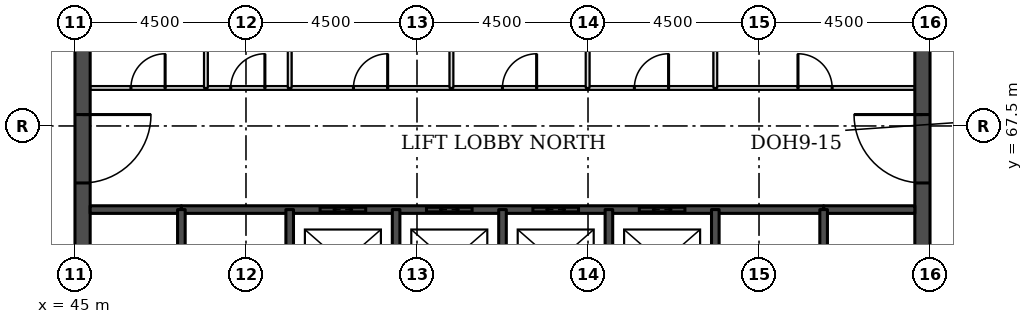
"""IFC4 building model, lengths in metres.
Left out: names, types, materials, properties, quantities, classifications, styles, units other than length and angle.
Written with IfcOpenShell. Run it as: python <this file> out.ifc"""

import sys

from ifc_helpers import new_model, si_unit, direction, frame, frame_2d, origin, place, context, subcontext, project, spatial, rectangle, extrude, element, fill, save


model = new_model("IFC4")
c1 = context("Model", 3, precision=1e-05, world=origin(), true_north=direction((0.0, 1.0)))
c2 = subcontext(c1, "Body", "Model", "MODEL_VIEW")
j1 = project(units=[si_unit("LENGTHUNIT", "METRE"), si_unit("PLANEANGLEUNIT", "RADIAN")], contexts=[c1])
p1 = place(None, origin())
s1 = spatial("IfcSite", under=j1, at=p1, CompositionType="ELEMENT")
p2 = place(p1, origin())
s2 = spatial("IfcBuilding", under=s1, at=p2, CompositionType="ELEMENT")
p3 = place(p2, frame((0.0, 0.0, 211.9)))
s3 = spatial("IfcBuildingStorey", under=s2, at=p3, CompositionType="ELEMENT", Elevation=211.9)
p4 = place(p3, frame((45.2, 49.5, 0.0), z_axis=(0.0, 0.0, 1.0), x_axis=(0.0, 1.0, 0.0)))
e1 = element("IfcWall", 1, at=p4, inside=s3, PredefinedType="SHEAR", context=c2, shape_type="SweptSolid", body=[
    extrude(rectangle(XDim=22.5, YDim=0.4, at=frame_2d((11.25, 0.0))), origin(), (0.0, 0.0, 1.0), 3.7),
])
p5 = place(p4, frame((4.2, 0.0, 0.0)))
e2 = element("IfcOpeningElement", 2, at=p5, cuts=e1, PredefinedType="OPENING", context=c2, shape_type="SweptSolid", body=[
    extrude(rectangle(XDim=1.8, YDim=2.1, at=frame_2d((0.9, 1.05))), frame((0.0, 0.21, 0.0), z_axis=(0.0, -1.0, 0.0), x_axis=(1.0, 0.0, 0.0)), (0.0, 0.0, 1.0), 0.42),
])
p6 = place(p4, frame((6.9, 0.0, 0.0)))
e3 = element("IfcOpeningElement", 3, at=p6, cuts=e1, PredefinedType="OPENING", context=c2, shape_type="SweptSolid", body=[
    extrude(rectangle(XDim=1.1, YDim=2.1, at=frame_2d((0.55, 1.05))), frame((0.0, 0.21, 0.0), z_axis=(0.0, -1.0, 0.0), x_axis=(1.0, 0.0, 0.0)), (0.0, 0.0, 1.0), 0.42),
])
p7 = place(p4, frame((13.6, 0.0, 0.0)))
e4 = element("IfcOpeningElement", 4, at=p7, cuts=e1, PredefinedType="OPENING", context=c2, shape_type="SweptSolid", body=[
    extrude(rectangle(XDim=1.1, YDim=2.1, at=frame_2d((0.55, 1.05))), frame((0.0, 0.21, 0.0), z_axis=(0.0, -1.0, 0.0), x_axis=(1.0, 0.0, 0.0)), (0.0, 0.0, 1.0), 0.42),
])
p8 = place(p4, frame((16.5, 0.0, 0.0)))
e5 = element("IfcOpeningElement", 5, at=p8, cuts=e1, PredefinedType="OPENING", context=c2, shape_type="SweptSolid", body=[
    extrude(rectangle(XDim=1.8, YDim=2.1, at=frame_2d((0.9, 1.05))), frame((0.0, 0.21, 0.0), z_axis=(0.0, -1.0, 0.0), x_axis=(1.0, 0.0, 0.0)), (0.0, 0.0, 1.0), 0.42),
])
p9 = place(p3, frame((67.3, 49.5, 0.0), z_axis=(0.0, 0.0, 1.0), x_axis=(0.0, 1.0, 0.0)))
e6 = element("IfcWall", 6, at=p9, inside=s3, PredefinedType="SHEAR", context=c2, shape_type="SweptSolid", body=[
    extrude(rectangle(XDim=22.5, YDim=0.4, at=frame_2d((11.25, 0.0))), origin(), (0.0, 0.0, 1.0), 3.7),
])
p10 = place(p9, frame((4.2, 0.0, 0.0)))
e7 = element("IfcOpeningElement", 7, at=p10, cuts=e6, PredefinedType="OPENING", context=c2, shape_type="SweptSolid", body=[
    extrude(rectangle(XDim=1.8, YDim=2.1, at=frame_2d((0.9, 1.05))), frame((0.0, 0.21, 0.0), z_axis=(0.0, -1.0, 0.0), x_axis=(1.0, 0.0, 0.0)), (0.0, 0.0, 1.0), 0.42),
])
p11 = place(p9, frame((6.9, 0.0, 0.0)))
e8 = element("IfcOpeningElement", 8, at=p11, cuts=e6, PredefinedType="OPENING", context=c2, shape_type="SweptSolid", body=[
    extrude(rectangle(XDim=1.1, YDim=2.1, at=frame_2d((0.55, 1.05))), frame((0.0, 0.21, 0.0), z_axis=(0.0, -1.0, 0.0), x_axis=(1.0, 0.0, 0.0)), (0.0, 0.0, 1.0), 0.42),
])
p12 = place(p9, frame((13.6, 0.0, 0.0)))
e9 = element("IfcOpeningElement", 9, at=p12, cuts=e6, PredefinedType="OPENING", context=c2, shape_type="SweptSolid", body=[
    extrude(rectangle(XDim=1.1, YDim=2.1, at=frame_2d((0.55, 1.05))), frame((0.0, 0.21, 0.0), z_axis=(0.0, -1.0, 0.0), x_axis=(1.0, 0.0, 0.0)), (0.0, 0.0, 1.0), 0.42),
])
p13 = place(p9, frame((16.5, 0.0, 0.0)))
e10 = element("IfcOpeningElement", 10, at=p13, cuts=e6, PredefinedType="OPENING", context=c2, shape_type="SweptSolid", body=[
    extrude(rectangle(XDim=1.8, YDim=2.1, at=frame_2d((0.9, 1.05))), frame((0.0, 0.21, 0.0), z_axis=(0.0, -1.0, 0.0), x_axis=(1.0, 0.0, 0.0)), (0.0, 0.0, 1.0), 0.42),
])
for number, where, z_axis, x_axis in (
    (11, (45.4, 65.3, 0.0), (0.0, 0.0, 1.0), (1.0, 0.0, 0.0)),
    (12, (64.7, 65.3, 0.0), (0.0, 0.0, 1.0), (1.0, 0.0, 0.0)),
):
    element("IfcWall", number, at=place(p3, frame(where, z_axis=z_axis, x_axis=x_axis)), inside=s3, PredefinedType="SOLIDWALL", context=c2, shape_type="SweptSolid", body=[
        extrude(rectangle(XDim=2.4, YDim=0.2, at=frame_2d((1.2, 0.0))), origin(), (0.0, 0.0, 1.0), 3.55),
    ])
p14 = place(p3, frame((47.8, 65.3, 0.0), z_axis=(0.0, 0.0, 1.0), x_axis=(1.0, 0.0, 0.0)))
e13 = element("IfcWall", 13, at=p14, inside=s3, PredefinedType="SOLIDWALL", context=c2, shape_type="SweptSolid", body=[
    extrude(rectangle(XDim=16.9, YDim=0.2, at=frame_2d((8.45, 0.0))), origin(), (0.0, 0.0, 1.0), 3.55),
])
p15 = place(p14, frame((3.65, 0.0, 0.0)))
e14 = element("IfcOpeningElement", 14, at=p15, cuts=e13, PredefinedType="OPENING", context=c2, shape_type="SweptSolid", body=[
    extrude(rectangle(XDim=1.2, YDim=2.1, at=frame_2d((0.6, 1.05))), frame((0.0, 0.11, 0.0), z_axis=(0.0, -1.0, 0.0), x_axis=(1.0, 0.0, 0.0)), (0.0, 0.0, 1.0), 0.22),
])
p16 = place(p14, frame((6.45, 0.0, 0.0)))
e15 = element("IfcOpeningElement", 15, at=p16, cuts=e13, PredefinedType="OPENING", context=c2, shape_type="SweptSolid", body=[
    extrude(rectangle(XDim=1.2, YDim=2.1, at=frame_2d((0.6, 1.05))), frame((0.0, 0.11, 0.0), z_axis=(0.0, -1.0, 0.0), x_axis=(1.0, 0.0, 0.0)), (0.0, 0.0, 1.0), 0.22),
])
p17 = place(p14, frame((9.25, 0.0, 0.0)))
e16 = element("IfcOpeningElement", 16, at=p17, cuts=e13, PredefinedType="OPENING", context=c2, shape_type="SweptSolid", body=[
    extrude(rectangle(XDim=1.2, YDim=2.1, at=frame_2d((0.6, 1.05))), frame((0.0, 0.11, 0.0), z_axis=(0.0, -1.0, 0.0), x_axis=(1.0, 0.0, 0.0)), (0.0, 0.0, 1.0), 0.22),
])
p18 = place(p14, frame((12.05, 0.0, 0.0)))
e17 = element("IfcOpeningElement", 17, at=p18, cuts=e13, PredefinedType="OPENING", context=c2, shape_type="SweptSolid", body=[
    extrude(rectangle(XDim=1.2, YDim=2.1, at=frame_2d((0.6, 1.05))), frame((0.0, 0.11, 0.0), z_axis=(0.0, -1.0, 0.0), x_axis=(1.0, 0.0, 0.0)), (0.0, 0.0, 1.0), 0.22),
])
p19 = place(p3, frame((45.4, 68.5, 0.0), z_axis=(0.0, 0.0, 1.0), x_axis=(1.0, 0.0, 0.0)))
e18 = element("IfcWall", 18, at=p19, inside=s3, PredefinedType="PARTITIONING", context=c2, shape_type="SweptSolid", body=[
    extrude(rectangle(XDim=21.7, YDim=0.1, at=frame_2d((10.85, 0.0))), origin(), (0.0, 0.0, 1.0), 3.55),
])
p20 = place(p19, frame((18.625, 0.0, 0.0)))
e19 = element("IfcOpeningElement", 19, at=p20, cuts=e18, PredefinedType="OPENING", context=c2, shape_type="SweptSolid", body=[
    extrude(rectangle(XDim=0.9, YDim=2.1, at=frame_2d((0.45, 1.05))), frame((0.0, 0.06, 0.0), z_axis=(0.0, -1.0, 0.0), x_axis=(1.0, 0.0, 0.0)), (0.0, 0.0, 1.0), 0.12),
])
p21 = place(p19, frame((1.073, 0.0, 0.0)))
e20 = element("IfcOpeningElement", 20, at=p21, cuts=e18, PredefinedType="OPENING", context=c2, shape_type="SweptSolid", body=[
    extrude(rectangle(XDim=0.9, YDim=2.1, at=frame_2d((0.45, 1.05))), frame((0.0, 0.06, 0.0), z_axis=(0.0, -1.0, 0.0), x_axis=(1.0, 0.0, 0.0)), (0.0, 0.0, 1.0), 0.12),
])
p22 = place(p19, frame((3.698, 0.0, 0.0)))
e21 = element("IfcOpeningElement", 21, at=p22, cuts=e18, PredefinedType="OPENING", context=c2, shape_type="SweptSolid", body=[
    extrude(rectangle(XDim=0.9, YDim=2.1, at=frame_2d((0.45, 1.05))), frame((0.0, 0.06, 0.0), z_axis=(0.0, -1.0, 0.0), x_axis=(1.0, 0.0, 0.0)), (0.0, 0.0, 1.0), 0.12),
])
p23 = place(p19, frame((14.32, 0.0, 0.0)))
e22 = element("IfcOpeningElement", 22, at=p23, cuts=e18, PredefinedType="OPENING", context=c2, shape_type="SweptSolid", body=[
    extrude(rectangle(XDim=0.9, YDim=2.1, at=frame_2d((0.45, 1.05))), frame((0.0, 0.06, 0.0), z_axis=(0.0, -1.0, 0.0), x_axis=(1.0, 0.0, 0.0)), (0.0, 0.0, 1.0), 0.12),
])
p24 = place(p19, frame((10.848, 0.0, 0.0)))
e23 = element("IfcOpeningElement", 23, at=p24, cuts=e18, PredefinedType="OPENING", context=c2, shape_type="SweptSolid", body=[
    extrude(rectangle(XDim=0.9, YDim=2.1, at=frame_2d((0.45, 1.05))), frame((0.0, 0.06, 0.0), z_axis=(0.0, -1.0, 0.0), x_axis=(1.0, 0.0, 0.0)), (0.0, 0.0, 1.0), 0.12),
])
p25 = place(p19, frame((6.928, 0.0, 0.0)))
e24 = element("IfcOpeningElement", 24, at=p25, cuts=e18, PredefinedType="OPENING", context=c2, shape_type="SweptSolid", body=[
    extrude(rectangle(XDim=0.9, YDim=2.1, at=frame_2d((0.45, 1.05))), frame((0.0, 0.06, 0.0), z_axis=(0.0, -1.0, 0.0), x_axis=(1.0, 0.0, 0.0)), (0.0, 0.0, 1.0), 0.12),
])
p26 = place(p3, frame((47.8, 62.0, 0.0), z_axis=(0.0, 0.0, 1.0), x_axis=(0.0, 1.0, 0.0)))
e25 = element("IfcWall", 25, at=p26, inside=s3, PredefinedType="SOLIDWALL", context=c2, shape_type="SweptSolid", body=[
    extrude(rectangle(XDim=3.3, YDim=0.2, at=frame_2d((1.65, 0.0))), origin(), (0.0, 0.0, 1.0), 3.55),
])
p27 = place(p26, frame((1.1, 0.0, 0.0)))
e26 = element("IfcOpeningElement", 26, at=p27, cuts=e25, PredefinedType="OPENING", context=c2, shape_type="SweptSolid", body=[
    extrude(rectangle(XDim=1.1, YDim=2.1, at=frame_2d((0.55, 1.05))), frame((0.0, 0.11, 0.0), z_axis=(0.0, -1.0, 0.0), x_axis=(1.0, 0.0, 0.0)), (0.0, 0.0, 1.0), 0.22),
])
for number, where, z_axis, x_axis in (
    (27, (48.445, 68.5, 0.0), (0.0, 0.0, 1.0), (0.0, 1.0, 0.0)),
    (28, (50.65, 68.5, 0.0), (0.0, 0.0, 1.0), (0.0, 1.0, 0.0)),
):
    element("IfcWall", number, at=place(p3, frame(where, z_axis=z_axis, x_axis=x_axis)), inside=s3, PredefinedType="PARTITIONING", context=c2, shape_type="SweptSolid", body=[
        extrude(rectangle(XDim=3.1, YDim=0.1, at=frame_2d((1.55, 0.0))), origin(), (0.0, 0.0, 1.0), 3.55),
    ])
p28 = place(p3, frame((50.65, 62.0, 0.0), z_axis=(0.0, 0.0, 1.0), x_axis=(0.0, 1.0, 0.0)))
e29 = element("IfcWall", 29, at=p28, inside=s3, PredefinedType="SOLIDWALL", context=c2, shape_type="SweptSolid", body=[
    extrude(rectangle(XDim=3.3, YDim=0.2, at=frame_2d((1.65, 0.0))), origin(), (0.0, 0.0, 1.0), 3.55),
])
p29 = place(p3, frame((53.45, 62.5, 0.0), z_axis=(0.0, 0.0, 1.0), x_axis=(0.0, 1.0, 0.0)))
e30 = element("IfcWall", 30, at=p29, inside=s3, PredefinedType="SOLIDWALL", context=c2, shape_type="SweptSolid", body=[
    extrude(rectangle(XDim=2.8, YDim=0.2, at=frame_2d((1.4, 0.0))), origin(), (0.0, 0.0, 1.0), 3.55),
])
p30 = place(p3, frame((54.906, 68.5, 0.0), z_axis=(0.0, 0.0, 1.0), x_axis=(0.0, 1.0, 0.0)))
e31 = element("IfcWall", 31, at=p30, inside=s3, PredefinedType="PARTITIONING", context=c2, shape_type="SweptSolid", body=[
    extrude(rectangle(XDim=3.1, YDim=0.1, at=frame_2d((1.55, 0.0))), origin(), (0.0, 0.0, 1.0), 3.55),
])
p31 = place(p3, frame((56.25, 62.5, 0.0), z_axis=(0.0, 0.0, 1.0), x_axis=(0.0, 1.0, 0.0)))
e32 = element("IfcWall", 32, at=p31, inside=s3, PredefinedType="SOLIDWALL", context=c2, shape_type="SweptSolid", body=[
    extrude(rectangle(XDim=2.8, YDim=0.2, at=frame_2d((1.4, 0.0))), origin(), (0.0, 0.0, 1.0), 3.55),
])
p32 = place(p3, frame((58.49, 68.5, 0.0), z_axis=(0.0, 0.0, 1.0), x_axis=(0.0, 1.0, 0.0)))
e33 = element("IfcWall", 33, at=p32, inside=s3, PredefinedType="PARTITIONING", context=c2, shape_type="SweptSolid", body=[
    extrude(rectangle(XDim=3.1, YDim=0.1, at=frame_2d((1.55, 0.0))), origin(), (0.0, 0.0, 1.0), 3.55),
])
p33 = place(p3, frame((59.05, 62.5, 0.0), z_axis=(0.0, 0.0, 1.0), x_axis=(0.0, 1.0, 0.0)))
e34 = element("IfcWall", 34, at=p33, inside=s3, PredefinedType="SOLIDWALL", context=c2, shape_type="SweptSolid", body=[
    extrude(rectangle(XDim=2.8, YDim=0.2, at=frame_2d((1.4, 0.0))), origin(), (0.0, 0.0, 1.0), 3.55),
])
p34 = place(p3, frame((61.85, 68.5, 0.0), z_axis=(0.0, 0.0, 1.0), x_axis=(0.0, 1.0, 0.0)))
e35 = element("IfcWall", 35, at=p34, inside=s3, PredefinedType="PARTITIONING", context=c2, shape_type="SweptSolid", body=[
    extrude(rectangle(XDim=3.1, YDim=0.1, at=frame_2d((1.55, 0.0))), origin(), (0.0, 0.0, 1.0), 3.55),
])
p35 = place(p3, frame((61.85, 62.0, 0.0), z_axis=(0.0, 0.0, 1.0), x_axis=(0.0, 1.0, 0.0)))
e36 = element("IfcWall", 36, at=p35, inside=s3, PredefinedType="SOLIDWALL", context=c2, shape_type="SweptSolid", body=[
    extrude(rectangle(XDim=3.3, YDim=0.2, at=frame_2d((1.65, 0.0))), origin(), (0.0, 0.0, 1.0), 3.55),
])
p36 = place(p3, frame((64.7, 62.0, 0.0), z_axis=(0.0, 0.0, 1.0), x_axis=(0.0, 1.0, 0.0)))
e37 = element("IfcWall", 37, at=p36, inside=s3, PredefinedType="SOLIDWALL", context=c2, shape_type="SweptSolid", body=[
    extrude(rectangle(XDim=3.3, YDim=0.2, at=frame_2d((1.65, 0.0))), origin(), (0.0, 0.0, 1.0), 3.55),
])
p37 = place(p36, frame((1.1, 0.0, 0.0)))
e38 = element("IfcOpeningElement", 38, at=p37, cuts=e37, PredefinedType="OPENING", context=c2, shape_type="SweptSolid", body=[
    extrude(rectangle(XDim=1.1, YDim=2.1, at=frame_2d((0.55, 1.05))), frame((0.0, 0.11, 0.0), z_axis=(0.0, -1.0, 0.0), x_axis=(1.0, 0.0, 0.0)), (0.0, 0.0, 1.0), 0.22),
])
p38 = place(p15, origin())
e39 = element("IfcDoor", 39, at=p38, inside=s3, OperationType="DOUBLE_DOOR_SLIDING", PredefinedType="DOOR", context=c2, shape_type="SweptSolid", body=[
    extrude(rectangle(XDim=1.2, YDim=2.1, at=frame_2d((0.6, 1.05))), frame((0.0, 0.025, 0.0), z_axis=(0.0, -1.0, 0.0), x_axis=(1.0, 0.0, 0.0)), (0.0, 0.0, 1.0), 0.05),
])
fill(e14, e39)
p39 = place(p16, origin())
e40 = element("IfcDoor", 40, at=p39, inside=s3, OperationType="DOUBLE_DOOR_SLIDING", PredefinedType="DOOR", context=c2, shape_type="SweptSolid", body=[
    extrude(rectangle(XDim=1.2, YDim=2.1, at=frame_2d((0.6, 1.05))), frame((0.0, 0.025, 0.0), z_axis=(0.0, -1.0, 0.0), x_axis=(1.0, 0.0, 0.0)), (0.0, 0.0, 1.0), 0.05),
])
fill(e15, e40)
p40 = place(p17, origin())
e41 = element("IfcDoor", 41, at=p40, inside=s3, OperationType="DOUBLE_DOOR_SLIDING", PredefinedType="DOOR", context=c2, shape_type="SweptSolid", body=[
    extrude(rectangle(XDim=1.2, YDim=2.1, at=frame_2d((0.6, 1.05))), frame((0.0, 0.025, 0.0), z_axis=(0.0, -1.0, 0.0), x_axis=(1.0, 0.0, 0.0)), (0.0, 0.0, 1.0), 0.05),
])
fill(e16, e41)
p41 = place(p18, origin())
e42 = element("IfcDoor", 42, at=p41, inside=s3, OperationType="DOUBLE_DOOR_SLIDING", PredefinedType="DOOR", context=c2, shape_type="SweptSolid", body=[
    extrude(rectangle(XDim=1.2, YDim=2.1, at=frame_2d((0.6, 1.05))), frame((0.0, 0.025, 0.0), z_axis=(0.0, -1.0, 0.0), x_axis=(1.0, 0.0, 0.0)), (0.0, 0.0, 1.0), 0.05),
])
fill(e17, e42)
p42 = place(p8, frame((1.8, 0.0, 0.0), z_axis=(0.0, 0.0, 1.0), x_axis=(-1.0, 0.0, 0.0)))
e43 = element("IfcDoor", 43, at=p42, inside=s3, OperationType="SINGLE_SWING_LEFT", PredefinedType="DOOR", context=c2, shape_type="SweptSolid", body=[
    extrude(rectangle(XDim=1.8, YDim=2.1, at=frame_2d((0.9, 1.05))), frame((0.0, 0.025, 0.0), z_axis=(0.0, -1.0, 0.0), x_axis=(1.0, 0.0, 0.0)), (0.0, 0.0, 1.0), 0.05),
])
fill(e5, e43)
p43 = place(p13, origin())
e44 = element("IfcDoor", 44, at=p43, inside=s3, OperationType="SINGLE_SWING_RIGHT", PredefinedType="DOOR", context=c2, shape_type="SweptSolid", body=[
    extrude(rectangle(XDim=1.8, YDim=2.1, at=frame_2d((0.9, 1.05))), frame((0.0, 0.025, 0.0), z_axis=(0.0, -1.0, 0.0), x_axis=(1.0, 0.0, 0.0)), (0.0, 0.0, 1.0), 0.05),
])
fill(e10, e44)
p44 = place(p20, origin())
e45 = element("IfcDoor", 45, at=p44, inside=s3, OperationType="SINGLE_SWING_LEFT", PredefinedType="DOOR", context=c2, shape_type="SweptSolid", body=[
    extrude(rectangle(XDim=0.9, YDim=2.1, at=frame_2d((0.45, 1.05))), frame((0.0, 0.025, 0.0), z_axis=(0.0, -1.0, 0.0), x_axis=(1.0, 0.0, 0.0)), (0.0, 0.0, 1.0), 0.05),
])
fill(e19, e45)
p45 = place(p21, origin())
e46 = element("IfcDoor", 46, at=p45, inside=s3, OperationType="SINGLE_SWING_RIGHT", PredefinedType="DOOR", context=c2, shape_type="SweptSolid", body=[
    extrude(rectangle(XDim=0.9, YDim=2.1, at=frame_2d((0.45, 1.05))), frame((0.0, 0.025, 0.0), z_axis=(0.0, -1.0, 0.0), x_axis=(1.0, 0.0, 0.0)), (0.0, 0.0, 1.0), 0.05),
])
fill(e20, e46)
p46 = place(p22, origin())
e47 = element("IfcDoor", 47, at=p46, inside=s3, OperationType="SINGLE_SWING_RIGHT", PredefinedType="DOOR", context=c2, shape_type="SweptSolid", body=[
    extrude(rectangle(XDim=0.9, YDim=2.1, at=frame_2d((0.45, 1.05))), frame((0.0, 0.025, 0.0), z_axis=(0.0, -1.0, 0.0), x_axis=(1.0, 0.0, 0.0)), (0.0, 0.0, 1.0), 0.05),
])
fill(e21, e47)
p47 = place(p23, origin())
e48 = element("IfcDoor", 48, at=p47, inside=s3, OperationType="SINGLE_SWING_RIGHT", PredefinedType="DOOR", context=c2, shape_type="SweptSolid", body=[
    extrude(rectangle(XDim=0.9, YDim=2.1, at=frame_2d((0.45, 1.05))), frame((0.0, 0.025, 0.0), z_axis=(0.0, -1.0, 0.0), x_axis=(1.0, 0.0, 0.0)), (0.0, 0.0, 1.0), 0.05),
])
fill(e22, e48)
p48 = place(p24, origin())
e49 = element("IfcDoor", 49, at=p48, inside=s3, OperationType="SINGLE_SWING_RIGHT", PredefinedType="DOOR", context=c2, shape_type="SweptSolid", body=[
    extrude(rectangle(XDim=0.9, YDim=2.1, at=frame_2d((0.45, 1.05))), frame((0.0, 0.025, 0.0), z_axis=(0.0, -1.0, 0.0), x_axis=(1.0, 0.0, 0.0)), (0.0, 0.0, 1.0), 0.05),
])
fill(e23, e49)
p49 = place(p25, origin())
e50 = element("IfcDoor", 50, at=p49, inside=s3, OperationType="SINGLE_SWING_RIGHT", PredefinedType="DOOR", context=c2, shape_type="SweptSolid", body=[
    extrude(rectangle(XDim=0.9, YDim=2.1, at=frame_2d((0.45, 1.05))), frame((0.0, 0.025, 0.0), z_axis=(0.0, -1.0, 0.0), x_axis=(1.0, 0.0, 0.0)), (0.0, 0.0, 1.0), 0.05),
])
fill(e24, e50)
save(model, sys.argv[1])
